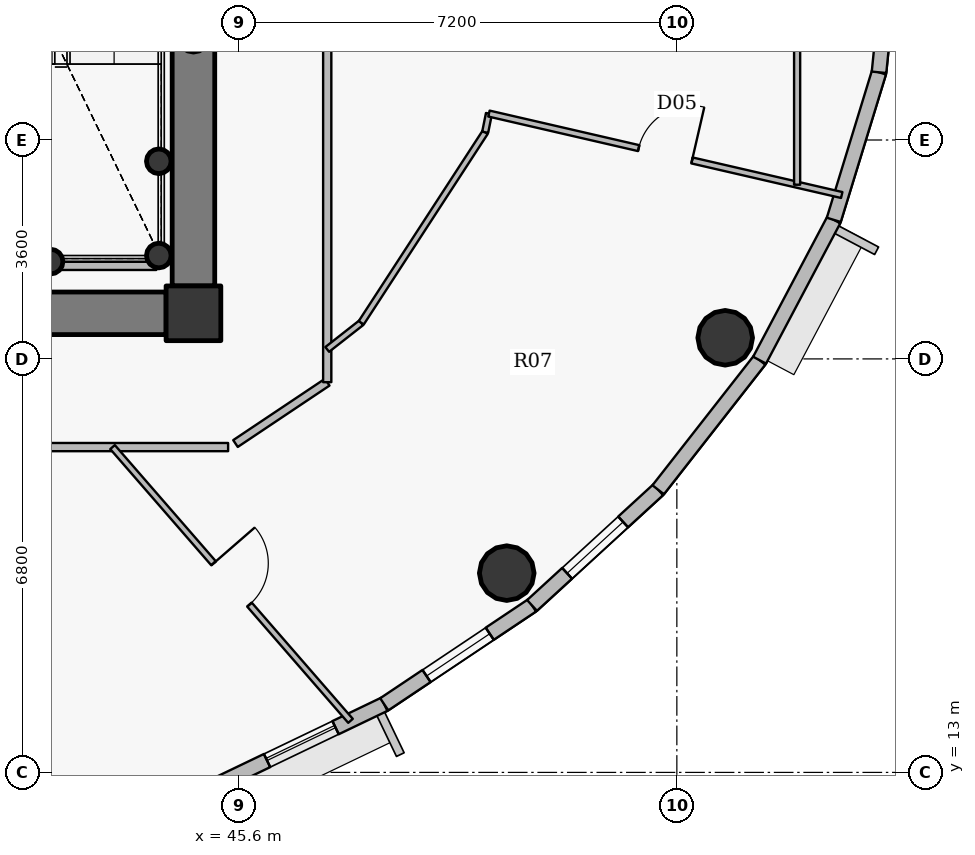
"""IFC4 building model, lengths in metres.
Left out: names, types, materials, properties, quantities, classifications, styles, units other than length and angle.
Written with IfcOpenShell. Run it as: python <this file> out.ifc"""

import sys

from ifc_helpers import new_model, si_unit, direction, frame, frame_2d, origin, origin_2d, place, context, subcontext, project, spatial, rectangle, hollow_circle, extrude, source, transform, mapped, element, fill, save


model = new_model("IFC4")
c1 = context("Model", 3, precision=1e-05, world=origin(), true_north=direction((0.0, 1.0)))
c2 = subcontext(c1, "Body", "Model", "MODEL_VIEW")
j1 = project(units=[si_unit("LENGTHUNIT", "METRE"), si_unit("PLANEANGLEUNIT", "RADIAN")], contexts=[c1])
p1 = place(None, origin())
s1 = spatial("IfcSite", under=j1, at=p1, CompositionType="ELEMENT")
p2 = place(p1, origin())
s2 = spatial("IfcBuilding", under=s1, at=p2, CompositionType="ELEMENT")
p3 = place(p2, frame((0.0, 0.0, 339.2)))
s3 = spatial("IfcBuildingStorey", under=s2, at=p3, CompositionType="ELEMENT", Elevation=339.2)
p4 = place(p3, frame((44.85, 20.55, 0.0), z_axis=(0.0, 0.0, 1.0), x_axis=(1.0, 0.0, 0.0)))
e1 = element("IfcColumn", 1, at=p4, inside=s3, PredefinedType="COLUMN", context=c2, shape_type="SweptSolid", body=[
    extrude(rectangle(XDim=0.9, YDim=0.9, at=origin_2d()), origin(), (0.0, 0.0, 1.0), 3.8),
])
for number, where, z_axis, x_axis in (
    (2, (44.28, 21.5, 0.0), (0.0, 0.0, 1.0), (1.0, 0.0, 0.0)),
    (3, (44.28, 23.05, 0.0), (0.0, 0.0, 1.0), (1.0, 0.0, 0.0)),
    (4, (42.5, 21.4, 0.0), (0.0, 0.0, 1.0), (1.0, 0.0, 0.0)),
):
    element("IfcColumn", number, at=place(p3, frame(where, z_axis=z_axis, x_axis=x_axis)), inside=s3, PredefinedType="COLUMN", context=c2, shape_type="SweptSolid", body=[
        extrude(hollow_circle(Radius=0.203, WallThickness=0.016, at=origin_2d()), origin(), (0.0, 0.0, 1.0), 3.8),
    ])
p5 = place(p3, frame((44.85, 33.0, 0.0), z_axis=(0.0, 0.0, 1.0), x_axis=(0.0, -1.0, 0.0)))
e5 = element("IfcWall", 5, at=p5, inside=s3, PredefinedType="SHEAR", context=c2, shape_type="SweptSolid", body=[
    extrude(rectangle(XDim=12.0, YDim=0.7, at=frame_2d((6.0, 0.0))), origin(), (0.0, 0.0, 1.0), 3.1),
])
p6 = place(p3, frame((44.4, 20.55, 0.0), z_axis=(0.0, 0.0, 1.0), x_axis=(-1.0, 0.0, 0.0)))
e6 = element("IfcWall", 6, at=p6, inside=s3, PredefinedType="SHEAR", context=c2, shape_type="SweptSolid", body=[
    extrude(rectangle(XDim=16.8, YDim=0.7, at=frame_2d((8.4, 0.0))), origin(), (0.0, 0.0, 1.0), 3.1),
])
p7 = place(p6, frame((13.0, 0.0, 0.0)))
e7 = element("IfcOpeningElement", 7, at=p7, cuts=e6, PredefinedType="OPENING", context=c2, shape_type="SweptSolid", body=[
    extrude(rectangle(XDim=1.15, YDim=2.15, at=origin_2d()), frame((0.575, 0.36, 1.075), z_axis=(0.0, -1.0, 0.0), x_axis=(1.0, 0.0, 0.0)), (0.0, 0.0, 1.0), 0.72),
])
p8 = place(p6, frame((9.15, 0.0, 0.0)))
e8 = element("IfcOpeningElement", 8, at=p8, cuts=e6, PredefinedType="OPENING", context=c2, shape_type="SweptSolid", body=[
    extrude(rectangle(XDim=1.15, YDim=2.15, at=origin_2d()), frame((0.575, 0.36, 1.075), z_axis=(0.0, -1.0, 0.0), x_axis=(1.0, 0.0, 0.0)), (0.0, 0.0, 1.0), 0.72),
])
for number, where, z_axis, x_axis in (
    (9, (42.137, 12.506, 0.0), (0.0, 0.0, 1.0), (1.0, 0.0, 0.0)),
    (10, (50.002, 16.277, 0.0), (0.0, 0.0, 1.0), (1.0, 0.0, 0.0)),
    (11, (53.595, 20.147, 0.0), (0.0, 0.0, 1.0), (1.0, 0.0, 0.0)),
):
    element("IfcColumn", number, at=place(p3, frame(where, z_axis=z_axis, x_axis=x_axis)), inside=s3, PredefinedType="COLUMN", context=c2, shape_type="SweptSolid", body=[
        extrude(hollow_circle(Radius=0.45, WallThickness=0.028, at=origin_2d()), origin(), (0.0, 0.0, 1.0), 3.8),
    ])
p9 = place(p3, frame((47.988, 14.12, 0.0), z_axis=(0.0, 0.0, 1.0), x_axis=(-0.901557057889, -0.432660226241, 0.0)))
e12 = element("IfcWall", 12, at=p9, inside=s3, PredefinedType="SOLIDWALL", context=c2, shape_type="SweptSolid", body=[
    extrude(rectangle(XDim=3.025, YDim=0.24, at=frame_2d((1.513, 0.0))), origin(), (0.0, 0.0, 1.0), 3.55),
])
p10 = place(p9, frame((0.888, 0.0, 0.9)))
e13 = element("IfcOpeningElement", 13, at=p10, cuts=e12, PredefinedType="OPENING", context=c2, shape_type="SweptSolid", body=[
    extrude(rectangle(XDim=1.25, YDim=1.65, at=origin_2d()), frame((0.625, 0.13, 0.825), z_axis=(0.0, -1.0, 0.0), x_axis=(1.0, 0.0, 0.0)), (0.0, 0.0, 1.0), 0.26),
])
p11 = place(p3, frame((50.419, 15.746, 0.0), z_axis=(0.0, 0.0, 1.0), x_axis=(-0.831201688654, -0.555970999944, 0.0)))
e14 = element("IfcWall", 14, at=p11, inside=s3, PredefinedType="SOLIDWALL", context=c2, shape_type="SweptSolid", body=[
    extrude(rectangle(XDim=2.925, YDim=0.24, at=frame_2d((1.462, 0.0))), origin(), (0.0, 0.0, 1.0), 3.55),
])
p12 = place(p11, frame((0.837, 0.0, 0.9)))
e15 = element("IfcOpeningElement", 15, at=p12, cuts=e14, PredefinedType="OPENING", context=c2, shape_type="SweptSolid", body=[
    extrude(rectangle(XDim=1.25, YDim=1.65, at=origin_2d()), frame((0.625, 0.13, 0.825), z_axis=(0.0, -1.0, 0.0), x_axis=(1.0, 0.0, 0.0)), (0.0, 0.0, 1.0), 0.26),
])
p13 = place(p3, frame((52.493, 17.648, 0.0), z_axis=(0.0, 0.0, 1.0), x_axis=(-0.737020907932, -0.675869944051, 0.0)))
e16 = element("IfcWall", 16, at=p13, inside=s3, PredefinedType="SOLIDWALL", context=c2, shape_type="SweptSolid", body=[
    extrude(rectangle(XDim=2.815, YDim=0.24, at=frame_2d((1.407, 0.0))), origin(), (0.0, 0.0, 1.0), 3.55),
])
p14 = place(p13, frame((0.783, 0.0, 0.9)))
e17 = element("IfcOpeningElement", 17, at=p14, cuts=e16, PredefinedType="OPENING", context=c2, shape_type="SweptSolid", body=[
    extrude(rectangle(XDim=1.25, YDim=1.65, at=origin_2d()), frame((0.625, 0.13, 0.825), z_axis=(0.0, -1.0, 0.0), x_axis=(1.0, 0.0, 0.0)), (0.0, 0.0, 1.0), 0.26),
])
p15 = place(p3, frame((54.161, 19.779, 0.0), z_axis=(0.0, 0.0, 1.0), x_axis=(-0.616286367698, -0.78752213492, 0.0)))
e18 = element("IfcWall", 18, at=p15, inside=s3, PredefinedType="SOLIDWALL", context=c2, shape_type="SweptSolid", body=[
    extrude(rectangle(XDim=2.706, YDim=0.24, at=frame_2d((1.353, 0.0))), origin(), (0.0, 0.0, 1.0), 2.035),
])
p16 = place(p3, frame((55.381, 22.087, 0.0), z_axis=(0.0, 0.0, 1.0), x_axis=(-0.467487999989, -0.883999417345, 0.0)))
e19 = element("IfcWall", 19, at=p16, inside=s3, PredefinedType="SOLIDWALL", context=c2, shape_type="SweptSolid", body=[
    extrude(rectangle(XDim=2.61, YDim=0.24, at=frame_2d((1.305, 0.0))), origin(), (0.0, 0.0, 1.0), 2.035),
])
p17 = place(p3, frame((56.125, 24.513, 0.0), z_axis=(0.0, 0.0, 1.0), x_axis=(-0.293105547213, -0.956080089842, 0.0)))
e20 = element("IfcWall", 20, at=p17, inside=s3, PredefinedType="SOLIDWALL", context=c2, shape_type="SweptSolid", body=[
    extrude(rectangle(XDim=2.538, YDim=0.24, at=frame_2d((1.269, 0.0))), origin(), (0.0, 0.0, 1.0), 3.55),
])
p18 = place(p3, frame((56.375, 27.0, 0.0), z_axis=(0.0, 0.0, 1.0), x_axis=(-0.100025963401, -0.994984827344, 0.0)))
e21 = element("IfcWall", 21, at=p18, inside=s3, PredefinedType="SOLIDWALL", context=c2, shape_type="SweptSolid", body=[
    extrude(rectangle(XDim=2.499, YDim=0.24, at=frame_2d((1.25, 0.0))), origin(), (0.0, 0.0, 1.0), 3.55),
])
p19 = place(p3, frame((26.58, 18.35, 0.0), z_axis=(0.0, 0.0, 1.0), x_axis=(1.0, 0.0, 0.0)))
e22 = element("IfcWall", 22, at=p19, inside=s3, PredefinedType="PARTITIONING", context=c2, shape_type="SweptSolid", body=[
    extrude(rectangle(XDim=18.84, YDim=0.135, at=frame_2d((9.42, 0.0))), origin(), (0.0, 0.0, 1.0), 3.085),
])
p20 = place(p3, frame((43.519, 18.35, 0.0), z_axis=(0.0, 0.0, 1.0), x_axis=(0.656046983359, -0.754720051162, 0.0)))
e23 = element("IfcWall", 23, at=p20, inside=s3, PredefinedType="PARTITIONING", context=c2, shape_type="SweptSolid", body=[
    extrude(rectangle(XDim=5.965, YDim=0.1, at=frame_2d((2.983, 0.0))), origin(), (0.0, 0.0, 1.0), 3.035),
])
p21 = place(p20, frame((2.533, 0.0, 0.0)))
e24 = element("IfcOpeningElement", 24, at=p21, cuts=e23, PredefinedType="OPENING", context=c2, shape_type="SweptSolid", body=[
    extrude(rectangle(XDim=0.9, YDim=2.1, at=origin_2d()), frame((0.45, 0.06, 1.05), z_axis=(0.0, -1.0, 0.0), x_axis=(1.0, 0.0, 0.0)), (0.0, 0.0, 1.0), 0.12),
])
p22 = place(p3, frame((45.541, 18.408, 0.0), z_axis=(0.0, 0.0, 1.0), x_axis=(0.831180227396, 0.556003084151, 0.0)))
e25 = element("IfcWall", 25, at=p22, inside=s3, PredefinedType="PARTITIONING", context=c2, shape_type="SweptSolid", body=[
    extrude(rectangle(XDim=1.815, YDim=0.135, at=frame_2d((0.908, 0.0))), origin(), (0.0, 0.0, 1.0), 3.085),
])
p23 = place(p3, frame((47.05, 19.417, 0.0), z_axis=(0.0, 0.0, 1.0), x_axis=(0.0, 1.0, 0.0)))
e26 = element("IfcWall", 26, at=p23, inside=s3, PredefinedType="PARTITIONING", context=c2, shape_type="SweptSolid", body=[
    extrude(rectangle(XDim=13.37, YDim=0.135, at=frame_2d((6.685, 0.0))), origin(), (0.0, 0.0, 1.0), 2.25),
])
p24 = place(p23, frame((6.434, 0.0, 0.0)))
e27 = element("IfcOpeningElement", 27, at=p24, cuts=e26, PredefinedType="OPENING", context=c2, shape_type="SweptSolid", body=[
    extrude(rectangle(XDim=1.0, YDim=2.15, at=origin_2d()), frame((0.5, 0.078, 1.075), z_axis=(0.0, -1.0, 0.0), x_axis=(1.0, 0.0, 0.0)), (0.0, 0.0, 1.0), 0.155),
])
p25 = place(p3, frame((47.05, 19.956, 0.0), z_axis=(0.0, 0.0, 1.0), x_axis=(0.787164110493, 0.616743595956, 0.0)))
e28 = element("IfcWall", 28, at=p25, inside=s3, PredefinedType="PARTITIONING", context=c2, shape_type="SweptSolid", body=[
    extrude(rectangle(XDim=0.71, YDim=0.1, at=frame_2d((0.355, 0.0))), origin(), (0.0, 0.0, 1.0), 2.25),
])
p26 = place(p3, frame((47.609, 20.394, 0.0), z_axis=(0.0, 0.0, 1.0), x_axis=(0.545364838352, 0.838198778983, 0.0)))
e29 = element("IfcWall", 29, at=p26, inside=s3, PredefinedType="PARTITIONING", context=c2, shape_type="SweptSolid", body=[
    extrude(rectangle(XDim=3.738, YDim=0.1, at=frame_2d((1.869, 0.0))), origin(), (0.0, 0.0, 1.0), 2.25),
])
p27 = place(p3, frame((49.648, 23.527, 0.0), z_axis=(0.0, 0.0, 1.0), x_axis=(0.198359507495, 0.980129331153, 0.0)))
e30 = element("IfcWall", 30, at=p27, inside=s3, PredefinedType="PARTITIONING", context=c2, shape_type="SweptSolid", body=[
    extrude(rectangle(XDim=0.314, YDim=0.1, at=frame_2d((0.157, 0.0))), origin(), (0.0, 0.0, 1.0), 3.55),
])
p28 = place(p3, frame((49.71, 23.835, 0.0), z_axis=(0.0, 0.0, 1.0), x_axis=(0.974373225384, -0.224937363847, 0.0)))
e31 = element("IfcWall", 31, at=p28, inside=s3, PredefinedType="PARTITIONING", context=c2, shape_type="SweptSolid", body=[
    extrude(rectangle(XDim=5.954, YDim=0.1, at=frame_2d((2.977, 0.0))), origin(), (0.0, 0.0, 1.0), 3.035),
])
p29 = place(p28, frame((2.527, 0.0, 0.0)))
e32 = element("IfcOpeningElement", 32, at=p29, cuts=e31, PredefinedType="OPENING", context=c2, shape_type="SweptSolid", body=[
    extrude(rectangle(XDim=0.9, YDim=2.1, at=origin_2d()), frame((0.45, 0.06, 1.05), z_axis=(0.0, -1.0, 0.0), x_axis=(1.0, 0.0, 0.0)), (0.0, 0.0, 1.0), 0.12),
])
p30 = place(p3, frame((54.778, 22.665, 0.0), z_axis=(0.0, 0.0, 1.0), x_axis=(0.0, 1.0, 0.0)))
e33 = element("IfcWall", 33, at=p30, inside=s3, PredefinedType="PARTITIONING", context=c2, shape_type="SweptSolid", body=[
    extrude(rectangle(XDim=10.4, YDim=0.1, at=frame_2d((5.2, 0.0))), origin(), (0.0, 0.0, 1.0), 2.25),
])
p31 = place(p30, frame((6.139, 0.0, 0.0)))
e34 = element("IfcOpeningElement", 34, at=p31, cuts=e33, PredefinedType="OPENING", context=c2, shape_type="SweptSolid", body=[
    extrude(rectangle(XDim=0.9, YDim=2.1, at=origin_2d()), frame((0.45, 0.06, 1.05), z_axis=(0.0, -1.0, 0.0), x_axis=(1.0, 0.0, 0.0)), (0.0, 0.0, 1.0), 0.12),
])
p32 = place(p3, frame((44.24, 21.33, 0.0), z_axis=(0.0, 0.0, 1.0), x_axis=(-1.0, 0.0, 0.0)))
e35 = element("IfcWall", 35, at=p32, inside=s3, PredefinedType="PARTITIONING", context=c2, shape_type="SweptSolid", body=[
    extrude(rectangle(XDim=2.98, YDim=0.135, at=frame_2d((1.49, 0.0))), origin(), (0.0, 0.0, 1.0), 3.085),
])
p33 = place(p3, frame((44.41, 20.2, 0.0), z_axis=(0.0, 0.0, 1.0), x_axis=(1.0, 0.0, 0.0)))
e36 = element("IfcWall", 36, at=p33, inside=s3, PredefinedType="PARTITIONING", context=c2, shape_type="SweptSolid", body=[
    extrude(rectangle(XDim=0.79, YDim=0.135, at=frame_2d((0.395, 0.0))), origin(), (0.0, 0.0, 1.0), 2.25),
])
p34 = place(p3, frame((45.2, 20.508, 0.0), z_axis=(0.0, 0.0, 1.0), x_axis=(0.0, 1.0, 0.0)))
e37 = element("IfcWall", 37, at=p34, inside=s3, PredefinedType="PARTITIONING", context=c2, shape_type="SweptSolid", body=[
    extrude(rectangle(XDim=0.482, YDim=0.135, at=frame_2d((0.241, 0.0))), origin(), (0.0, 0.0, 1.0), 3.55),
])
m1 = source(origin(), c2, "Body", "SweptSolid", [
    extrude(rectangle(XDim=1.25, YDim=1.65, at=origin_2d()), frame((0.625, 0.03, 0.825), z_axis=(0.0, -1.0, 0.0), x_axis=(1.0, 0.0, 0.0)), (0.0, 0.0, 1.0), 0.06),
])
p35 = place(p10, origin())
e38 = element("IfcWindow", 38, at=p35, inside=s3, PartitioningType="SINGLE_PANEL", PredefinedType="WINDOW", context=c2, shape_type="MappedRepresentation", body=[
    mapped(m1, transform((0.0, 0.0, 0.0), x_axis=(1.0, 0.0, 0.0), y_axis=(0.0, 1.0, 0.0), z_axis=(0.0, 0.0, 1.0), scale=1.0)),
])
fill(e13, e38)
p36 = place(p12, origin())
e39 = element("IfcWindow", 39, at=p36, inside=s3, PartitioningType="SINGLE_PANEL", PredefinedType="WINDOW", context=c2, shape_type="MappedRepresentation", body=[
    mapped(m1, transform((0.0, 0.0, 0.0), x_axis=(1.0, 0.0, 0.0), y_axis=(0.0, 1.0, 0.0), z_axis=(0.0, 0.0, 1.0), scale=1.0)),
])
fill(e15, e39)
p37 = place(p14, origin())
e40 = element("IfcWindow", 40, at=p37, inside=s3, PartitioningType="SINGLE_PANEL", PredefinedType="WINDOW", context=c2, shape_type="MappedRepresentation", body=[
    mapped(m1, transform((0.0, 0.0, 0.0), x_axis=(1.0, 0.0, 0.0), y_axis=(0.0, 1.0, 0.0), z_axis=(0.0, 0.0, 1.0), scale=1.0)),
])
fill(e17, e40)
m2 = source(origin(), c2, "Body", "SweptSolid", [
    extrude(rectangle(XDim=0.9, YDim=2.1, at=origin_2d()), frame((0.45, 0.025, 1.05), z_axis=(0.0, -1.0, 0.0), x_axis=(1.0, 0.0, 0.0)), (0.0, 0.0, 1.0), 0.05),
])
p38 = place(p29, origin())
e41 = element("IfcDoor", 41, at=p38, inside=s3, OperationType="SINGLE_SWING_RIGHT", PredefinedType="DOOR", context=c2, shape_type="MappedRepresentation", body=[
    mapped(m2, transform((0.0, 0.0, 0.0), x_axis=(1.0, 0.0, 0.0), y_axis=(0.0, 1.0, 0.0), z_axis=(0.0, 0.0, 1.0), scale=1.0)),
])
fill(e32, e41)
p39 = place(p21, origin())
e42 = element("IfcDoor", 42, at=p39, inside=s3, OperationType="SINGLE_SWING_LEFT", PredefinedType="DOOR", context=c2, shape_type="MappedRepresentation", body=[
    mapped(m2, transform((0.0, 0.0, 0.0), x_axis=(1.0, 0.0, 0.0), y_axis=(0.0, 1.0, 0.0), z_axis=(0.0, 0.0, 1.0), scale=1.0)),
])
fill(e24, e42)
save(model, sys.argv[1])
